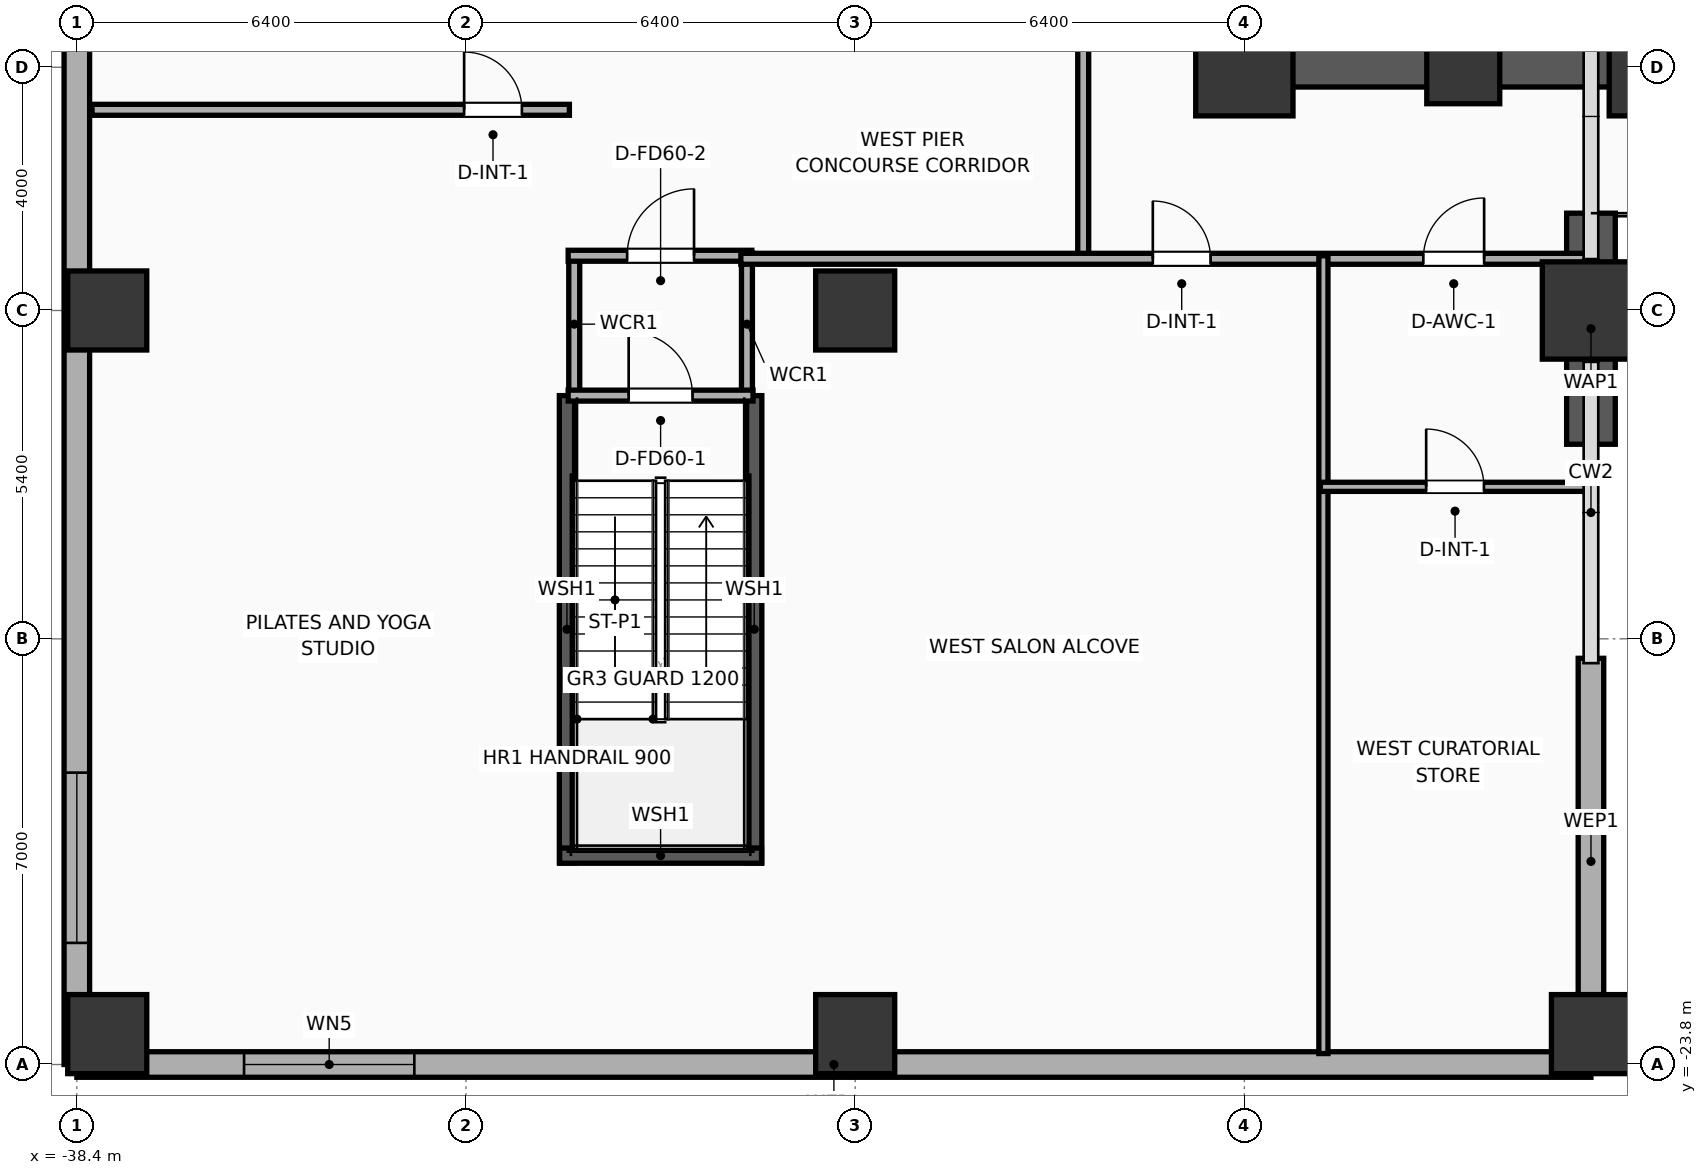
"""IFC4 building model, lengths in metres.
Left out: names, types, materials, properties, quantities, classifications, styles, units other than length and angle.
Written with IfcOpenShell. Run it as: python <this file> out.ifc"""

import sys

from ifc_helpers import new_model, si_unit, direction, frame, frame_2d, origin, origin_2d, place, context, subcontext, project, spatial, rectangle, extrude, element, fill, save


model = new_model("IFC4")
c1 = context("Model", 3, precision=1e-05, world=origin(), true_north=direction((0.0, 1.0)))
c2 = subcontext(c1, "Body", "Model", "MODEL_VIEW")
j1 = project(units=[si_unit("LENGTHUNIT", "METRE"), si_unit("PLANEANGLEUNIT", "RADIAN")], contexts=[c1])
p1 = place(None, origin())
s1 = spatial("IfcSite", under=j1, at=p1, CompositionType="ELEMENT")
p2 = place(p1, origin())
s2 = spatial("IfcBuilding", under=s1, at=p2, CompositionType="ELEMENT")
p3 = place(p2, frame((0.0, 0.0, 10.4)))
s3 = spatial("IfcBuildingStorey", under=s2, at=p3, CompositionType="ELEMENT", Elevation=10.4)
p4 = place(p3, frame((-19.2, -7.4, 0.0), z_axis=(0.0, 0.0, 1.0), x_axis=(1.0, 0.0, 0.0)))
e1 = element("IfcColumn", 1, at=p4, inside=s3, PredefinedType="COLUMN", context=c2, shape_type="SweptSolid", body=[
    extrude(rectangle(XDim=1.6, YDim=1.6, at=origin_2d()), origin(), (0.0, 0.0, 1.0), 5.2),
])
p5 = place(p3, frame((-15.6, -7.4, 0.0), z_axis=(0.0, 0.0, 1.0), x_axis=(1.0, 0.0, 0.0)))
e2 = element("IfcColumn", 2, at=p5, inside=s3, PredefinedType="COLUMN", context=c2, shape_type="SweptSolid", body=[
    extrude(rectangle(XDim=1.2, YDim=1.2, at=origin_2d()), origin(), (0.0, 0.0, 1.0), 5.2),
])
p6 = place(p3, frame((-12.4, -7.4, 0.0), z_axis=(0.0, 0.0, 1.0), x_axis=(1.0, 0.0, 0.0)))
e3 = element("IfcColumn", 3, at=p6, inside=s3, PredefinedType="COLUMN", context=c2, shape_type="SweptSolid", body=[
    extrude(rectangle(XDim=1.6, YDim=1.6, at=origin_2d()), origin(), (0.0, 0.0, 1.0), 5.2),
])
p7 = place(p3, frame((-19.525, -7.4, 0.0), z_axis=(0.0, 0.0, 1.0), x_axis=(1.0, 0.0, 0.0)))
e4 = element("IfcWall", 4, at=p7, inside=s3, PredefinedType="SHEAR", context=c2, shape_type="SweptSolid", body=[
    extrude(rectangle(XDim=7.45, YDim=0.65, at=frame_2d((3.725, 0.0))), origin(), (0.0, 0.0, 1.0), 4.92),
])
p8 = place(p3, frame((-19.145, -7.4, 0.0), z_axis=(0.0, 0.0, 1.0), x_axis=(0.0, 1.0, 0.0)))
e5 = element("IfcWall", 5, at=p8, inside=s3, PredefinedType="SHEAR", context=c2, shape_type="SweptSolid", body=[
    extrude(rectangle(XDim=14.8, YDim=0.65, at=frame_2d((7.4, 0.0))), origin(), (0.0, 0.0, 1.0), 4.92),
])
for number, where, z_axis, x_axis in (
    (6, (-30.34, -20.485, 0.0), (0.0, 0.0, 1.0), (0.0, 1.0, 0.0)),
    (7, (-27.26, -20.485, 0.0), (0.0, 0.0, 1.0), (0.0, 1.0, 0.0)),
):
    element("IfcWall", number, at=place(p3, frame(where, z_axis=z_axis, x_axis=x_axis)), inside=s3, PredefinedType="SOLIDWALL", context=c2, shape_type="SweptSolid", body=[
        extrude(rectangle(XDim=7.685, YDim=0.25, at=frame_2d((3.843, 0.0))), origin(), (0.0, 0.0, 1.0), 4.92),
    ])
p9 = place(p3, frame((-30.46, -20.365, 0.0), z_axis=(0.0, 0.0, 1.0), x_axis=(1.0, 0.0, 0.0)))
e8 = element("IfcWall", 8, at=p9, inside=s3, PredefinedType="SOLIDWALL", context=c2, shape_type="SweptSolid", body=[
    extrude(rectangle(XDim=3.32, YDim=0.25, at=frame_2d((1.66, 0.0))), origin(), (0.0, 0.0, 1.0), 4.92),
])
for number, where, z_axis, x_axis in (
    (9, (-37.9, -23.3, 0.0), (0.0, 0.0, 1.0), (1.0, 0.0, 0.0)),
    (10, (-37.9, -11.4, 0.0), (0.0, 0.0, 1.0), (1.0, 0.0, 0.0)),
    (11, (-25.6, -23.3, 0.0), (0.0, 0.0, 1.0), (1.0, 0.0, 0.0)),
    (12, (-25.6, -11.4, 0.0), (0.0, 0.0, 1.0), (1.0, 0.0, 0.0)),
    (13, (-13.5, -23.3, 0.0), (0.0, 0.0, 1.0), (1.0, 0.0, 0.0)),
):
    element("IfcColumn", number, at=place(p3, frame(where, z_axis=z_axis, x_axis=x_axis)), inside=s3, PredefinedType="COLUMN", context=c2, shape_type="SweptSolid", body=[
        extrude(rectangle(XDim=1.3, YDim=1.3, at=origin_2d()), origin(), (0.0, 0.0, 1.0), 5.2),
    ])
p10 = place(p3, frame((-13.5, -11.4, 0.0), z_axis=(0.0, 0.0, 1.0), x_axis=(1.0, 0.0, 0.0)))
e14 = element("IfcColumn", 14, at=p10, inside=s3, PredefinedType="COLUMN", context=c2, shape_type="SweptSolid", body=[
    extrude(rectangle(XDim=1.6, YDim=1.6, at=origin_2d()), origin(), (0.0, 0.0, 1.0), 5.2),
])
p11 = place(p3, frame((-13.5, -13.6, 0.0), z_axis=(0.0, 0.0, 1.0), x_axis=(0.0, 1.0, 0.0)))
e15 = element("IfcWall", 15, at=p11, inside=s3, PredefinedType="SOLIDWALL", context=c2, shape_type="SweptSolid", body=[
    extrude(rectangle(XDim=3.8, YDim=0.8, at=frame_2d((1.9, 0.0))), origin(), (0.0, 0.0, 1.0), 4.92),
])
p12 = place(p3, frame((-38.4, -23.8, 0.0), z_axis=(0.0, 0.0, 1.0), x_axis=(1.0, 0.0, 0.0)))
e16 = element("IfcWall", 16, at=p12, inside=s3, PredefinedType="ELEMENTEDWALL", context=c2, shape_type="SweptSolid", body=[
    extrude(rectangle(XDim=24.9, YDim=0.42, at=frame_2d((12.45, 0.0))), origin(), (0.0, 0.0, 1.0), 4.92),
])
p13 = place(p12, frame((2.75, 0.0, 0.65)))
e17 = element("IfcOpeningElement", 17, at=p13, cuts=e16, PredefinedType="OPENING", context=c2, shape_type="SweptSolid", body=[
    extrude(rectangle(XDim=2.8, YDim=2.6, at=frame_2d((1.4, 1.3))), frame((0.0, 0.22, 0.0), z_axis=(0.0, -1.0, 0.0), x_axis=(1.0, 0.0, 0.0)), (0.0, 0.0, 1.0), 0.44),
])
p14 = place(p3, frame((-13.5, -23.8, 0.0), z_axis=(0.0, 0.0, 1.0), x_axis=(0.0, 1.0, 0.0)))
e18 = element("IfcWall", 18, at=p14, inside=s3, PredefinedType="ELEMENTEDWALL", context=c2, shape_type="SweptSolid", body=[
    extrude(rectangle(XDim=6.68, YDim=0.42, at=frame_2d((3.34, 0.0))), origin(), (0.0, 0.0, 1.0), 4.21),
])
p15 = place(p3, frame((-38.4, 23.8, 0.0), z_axis=(0.0, 0.0, 1.0), x_axis=(0.0, -1.0, 0.0)))
e19 = element("IfcWall", 19, at=p15, inside=s3, PredefinedType="ELEMENTEDWALL", context=c2, shape_type="SweptSolid", body=[
    extrude(rectangle(XDim=47.6, YDim=0.42, at=frame_2d((23.8, 0.0))), origin(), (0.0, 0.0, 1.0), 4.92),
])
p16 = place(p15, frame((2.0, 0.0, 0.65)))
e20 = element("IfcOpeningElement", 20, at=p16, cuts=e19, PredefinedType="OPENING", context=c2, shape_type="SweptSolid", body=[
    extrude(rectangle(XDim=2.8, YDim=2.6, at=frame_2d((1.4, 1.3))), frame((0.0, 0.22, 0.0), z_axis=(0.0, -1.0, 0.0), x_axis=(1.0, 0.0, 0.0)), (0.0, 0.0, 1.0), 0.44),
])
p17 = place(p15, frame((15.6, 0.0, 0.65)))
e21 = element("IfcOpeningElement", 21, at=p17, cuts=e19, PredefinedType="OPENING", context=c2, shape_type="SweptSolid", body=[
    extrude(rectangle(XDim=2.8, YDim=2.6, at=frame_2d((1.4, 1.3))), frame((0.0, 0.22, 0.0), z_axis=(0.0, -1.0, 0.0), x_axis=(1.0, 0.0, 0.0)), (0.0, 0.0, 1.0), 0.44),
])
p18 = place(p15, frame((42.8, 0.0, 0.65)))
e22 = element("IfcOpeningElement", 22, at=p18, cuts=e19, PredefinedType="OPENING", context=c2, shape_type="SweptSolid", body=[
    extrude(rectangle(XDim=2.8, YDim=2.6, at=frame_2d((1.4, 1.3))), frame((0.0, 0.22, 0.0), z_axis=(0.0, -1.0, 0.0), x_axis=(1.0, 0.0, 0.0)), (0.0, 0.0, 1.0), 0.44),
])
p19 = place(p3, frame((-15.4, -4.8, 0.0), z_axis=(0.0, 0.0, 1.0), x_axis=(0.0, -1.0, 0.0)))
e23 = element("IfcWall", 23, at=p19, inside=s3, PredefinedType="SOLIDWALL", context=c2, shape_type="SweptSolid", body=[
    extrude(rectangle(XDim=2.6, YDim=0.25, at=frame_2d((1.3, 0.0))), origin(), (0.0, 0.0, 1.0), 4.92),
])
for number, where, z_axis, x_axis in (
    (24, (-30.22, -12.8, 0.0), (0.0, 0.0, 1.0), (0.0, 1.0, 0.0)),
    (25, (-27.38, -12.8, 0.0), (0.0, 0.0, 1.0), (0.0, 1.0, 0.0)),
):
    element("IfcWall", number, at=place(p3, frame(where, z_axis=z_axis, x_axis=x_axis)), inside=s3, PredefinedType="PARTITIONING", context=c2, shape_type="SweptSolid", body=[
        extrude(rectangle(XDim=2.35, YDim=0.18, at=frame_2d((1.175, 0.0))), origin(), (0.0, 0.0, 1.0), 4.92),
    ])
p20 = place(p3, frame((-30.32, -12.8, 0.0), z_axis=(0.0, 0.0, 1.0), x_axis=(1.0, 0.0, 0.0)))
e26 = element("IfcWall", 26, at=p20, inside=s3, PredefinedType="PARTITIONING", context=c2, shape_type="SweptSolid", body=[
    extrude(rectangle(XDim=3.04, YDim=0.18, at=frame_2d((1.52, 0.0))), origin(), (0.0, 0.0, 1.0), 4.92),
])
p21 = place(p20, frame((0.995, 0.0, 0.0)))
e27 = element("IfcOpeningElement", 27, at=p21, cuts=e26, PredefinedType="OPENING", context=c2, shape_type="SweptSolid", body=[
    extrude(rectangle(XDim=1.05, YDim=2.05, at=frame_2d((0.525, 1.025))), frame((0.0, 0.1, 0.0), z_axis=(0.0, -1.0, 0.0), x_axis=(1.0, 0.0, 0.0)), (0.0, 0.0, 1.0), 0.2),
])
p22 = place(p3, frame((-30.32, -10.5, 0.0), z_axis=(0.0, 0.0, 1.0), x_axis=(1.0, 0.0, 0.0)))
e28 = element("IfcWall", 28, at=p22, inside=s3, PredefinedType="PARTITIONING", context=c2, shape_type="SweptSolid", body=[
    extrude(rectangle(XDim=3.02, YDim=0.18, at=frame_2d((1.51, 0.0))), origin(), (0.0, 0.0, 1.0), 4.92),
])
p23 = place(p22, frame((0.97, 0.0, 0.0)))
e29 = element("IfcOpeningElement", 29, at=p23, cuts=e28, PredefinedType="OPENING", context=c2, shape_type="SweptSolid", body=[
    extrude(rectangle(XDim=1.1, YDim=2.05, at=frame_2d((0.55, 1.025))), frame((0.0, 0.1, 0.0), z_axis=(0.0, -1.0, 0.0), x_axis=(1.0, 0.0, 0.0)), (0.0, 0.0, 1.0), 0.2),
])
p24 = place(p3, frame((-38.15, -8.1, 0.0), z_axis=(0.0, 0.0, 1.0), x_axis=(1.0, 0.0, 0.0)))
e30 = element("IfcWall", 30, at=p24, inside=s3, PredefinedType="PARTITIONING", context=c2, shape_type="SweptSolid", body=[
    extrude(rectangle(XDim=7.85, YDim=0.18, at=frame_2d((3.925, 0.0))), origin(), (0.0, 0.0, 1.0), 4.92),
])
p25 = place(p24, frame((6.119, 0.0, 0.0)))
e31 = element("IfcOpeningElement", 31, at=p25, cuts=e30, PredefinedType="OPENING", context=c2, shape_type="SweptSolid", body=[
    extrude(rectangle(XDim=0.95, YDim=2.05, at=frame_2d((0.475, 1.025))), frame((0.0, 0.1, 0.0), z_axis=(0.0, -1.0, 0.0), x_axis=(1.0, 0.0, 0.0)), (0.0, 0.0, 1.0), 0.2),
])
p26 = place(p3, frame((-21.85, -10.5, 0.0), z_axis=(0.0, 0.0, 1.0), x_axis=(0.0, 1.0, 0.0)))
e32 = element("IfcWall", 32, at=p26, inside=s3, PredefinedType="PARTITIONING", context=c2, shape_type="SweptSolid", body=[
    extrude(rectangle(XDim=34.12, YDim=0.18, at=frame_2d((17.06, 0.0))), origin(), (0.0, 0.0, 1.0), 4.92),
])
p27 = place(p26, frame((13.531, 0.0, 0.0)))
e33 = element("IfcOpeningElement", 33, at=p27, cuts=e32, PredefinedType="OPENING", context=c2, shape_type="SweptSolid", body=[
    extrude(rectangle(XDim=1.6, YDim=2.05, at=frame_2d((0.8, 1.025))), frame((0.0, 0.1, 0.0), z_axis=(0.0, -1.0, 0.0), x_axis=(1.0, 0.0, 0.0)), (0.0, 0.0, 1.0), 0.2),
])
p28 = place(p3, frame((-27.48, -10.55, 0.0), z_axis=(0.0, 0.0, 1.0), x_axis=(1.0, 0.0, 0.0)))
e34 = element("IfcWall", 34, at=p28, inside=s3, PredefinedType="PARTITIONING", context=c2, shape_type="SweptSolid", body=[
    extrude(rectangle(XDim=13.96, YDim=0.18, at=frame_2d((6.98, 0.0))), origin(), (0.0, 0.0, 1.0), 4.92),
])
p29 = place(p28, frame((6.775, 0.0, 0.0)))
e35 = element("IfcOpeningElement", 35, at=p29, cuts=e34, PredefinedType="OPENING", context=c2, shape_type="SweptSolid", body=[
    extrude(rectangle(XDim=0.95, YDim=2.05, at=frame_2d((0.475, 1.025))), frame((0.0, 0.1, 0.0), z_axis=(0.0, -1.0, 0.0), x_axis=(1.0, 0.0, 0.0)), (0.0, 0.0, 1.0), 0.2),
])
p30 = place(p28, frame((11.223, 0.0, 0.0)))
e36 = element("IfcOpeningElement", 36, at=p30, cuts=e34, PredefinedType="OPENING", context=c2, shape_type="SweptSolid", body=[
    extrude(rectangle(XDim=1.0, YDim=2.05, at=frame_2d((0.5, 1.025))), frame((0.0, 0.1, 0.0), z_axis=(0.0, -1.0, 0.0), x_axis=(1.0, 0.0, 0.0)), (0.0, 0.0, 1.0), 0.2),
])
p31 = place(p3, frame((-17.9, -23.62, 0.0), z_axis=(0.0, 0.0, 1.0), x_axis=(0.0, 1.0, 0.0)))
e37 = element("IfcWall", 37, at=p31, inside=s3, PredefinedType="PLUMBINGWALL", context=c2, shape_type="SweptSolid", body=[
    extrude(rectangle(XDim=13.12, YDim=0.15, at=frame_2d((6.56, 0.0))), origin(), (0.0, 0.0, 1.0), 4.92),
])
p32 = place(p3, frame((-17.95, -14.3, 0.0), z_axis=(0.0, 0.0, 1.0), x_axis=(1.0, 0.0, 0.0)))
e38 = element("IfcWall", 38, at=p32, inside=s3, PredefinedType="PLUMBINGWALL", context=c2, shape_type="SweptSolid", body=[
    extrude(rectangle(XDim=4.43, YDim=0.15, at=frame_2d((2.215, 0.0))), origin(), (0.0, 0.0, 1.0), 4.92),
])
p33 = place(p32, frame((1.74, 0.0, 0.0)))
e39 = element("IfcOpeningElement", 39, at=p33, cuts=e38, PredefinedType="OPENING", context=c2, shape_type="SweptSolid", body=[
    extrude(rectangle(XDim=0.95, YDim=2.05, at=frame_2d((0.475, 1.025))), frame((0.0, 0.085, 0.0), z_axis=(0.0, -1.0, 0.0), x_axis=(1.0, 0.0, 0.0)), (0.0, 0.0, 1.0), 0.17),
])
p34 = place(p13, origin())
e40 = element("IfcWindow", 40, at=p34, inside=s3, PartitioningType="SINGLE_PANEL", PredefinedType="WINDOW", context=c2, shape_type="SweptSolid", body=[
    extrude(rectangle(XDim=2.8, YDim=2.6, at=frame_2d((1.4, 1.3))), frame((0.0, 0.03, 0.0), z_axis=(0.0, -1.0, 0.0), x_axis=(1.0, 0.0, 0.0)), (0.0, 0.0, 1.0), 0.06),
])
fill(e17, e40)
p35 = place(p18, origin())
e41 = element("IfcWindow", 41, at=p35, inside=s3, PartitioningType="SINGLE_PANEL", PredefinedType="WINDOW", context=c2, shape_type="SweptSolid", body=[
    extrude(rectangle(XDim=2.8, YDim=2.6, at=frame_2d((1.4, 1.3))), frame((0.0, 0.03, 0.0), z_axis=(0.0, -1.0, 0.0), x_axis=(1.0, 0.0, 0.0)), (0.0, 0.0, 1.0), 0.06),
])
fill(e22, e41)
p36 = place(p21, origin())
e42 = element("IfcDoor", 42, at=p36, inside=s3, OperationType="SINGLE_SWING_LEFT", PredefinedType="DOOR", context=c2, shape_type="SweptSolid", body=[
    extrude(rectangle(XDim=1.05, YDim=2.05, at=frame_2d((0.525, 1.025))), frame((0.0, 0.025, 0.0), z_axis=(0.0, -1.0, 0.0), x_axis=(1.0, 0.0, 0.0)), (0.0, 0.0, 1.0), 0.05),
])
fill(e27, e42)
p37 = place(p23, origin())
e43 = element("IfcDoor", 43, at=p37, inside=s3, OperationType="SINGLE_SWING_RIGHT", PredefinedType="DOOR", context=c2, shape_type="SweptSolid", body=[
    extrude(rectangle(XDim=1.1, YDim=2.05, at=frame_2d((0.55, 1.025))), frame((0.0, 0.025, 0.0), z_axis=(0.0, -1.0, 0.0), x_axis=(1.0, 0.0, 0.0)), (0.0, 0.0, 1.0), 0.05),
])
fill(e29, e43)
p38 = place(p25, origin())
e44 = element("IfcDoor", 44, at=p38, inside=s3, OperationType="SINGLE_SWING_LEFT", PredefinedType="DOOR", context=c2, shape_type="SweptSolid", body=[
    extrude(rectangle(XDim=0.95, YDim=2.05, at=frame_2d((0.475, 1.025))), frame((0.0, 0.025, 0.0), z_axis=(0.0, -1.0, 0.0), x_axis=(1.0, 0.0, 0.0)), (0.0, 0.0, 1.0), 0.05),
])
fill(e31, e44)
p39 = place(p29, origin())
e45 = element("IfcDoor", 45, at=p39, inside=s3, OperationType="SINGLE_SWING_LEFT", PredefinedType="DOOR", context=c2, shape_type="SweptSolid", body=[
    extrude(rectangle(XDim=0.95, YDim=2.05, at=frame_2d((0.475, 1.025))), frame((0.0, 0.025, 0.0), z_axis=(0.0, -1.0, 0.0), x_axis=(1.0, 0.0, 0.0)), (0.0, 0.0, 1.0), 0.05),
])
fill(e35, e45)
p40 = place(p30, origin())
e46 = element("IfcDoor", 46, at=p40, inside=s3, OperationType="SINGLE_SWING_RIGHT", PredefinedType="DOOR", context=c2, shape_type="SweptSolid", body=[
    extrude(rectangle(XDim=1.0, YDim=2.05, at=frame_2d((0.5, 1.025))), frame((0.0, 0.025, 0.0), z_axis=(0.0, -1.0, 0.0), x_axis=(1.0, 0.0, 0.0)), (0.0, 0.0, 1.0), 0.05),
])
fill(e36, e46)
p41 = place(p33, origin())
e47 = element("IfcDoor", 47, at=p41, inside=s3, OperationType="SINGLE_SWING_LEFT", PredefinedType="DOOR", context=c2, shape_type="SweptSolid", body=[
    extrude(rectangle(XDim=0.95, YDim=2.05, at=frame_2d((0.475, 1.025))), frame((0.0, 0.025, 0.0), z_axis=(0.0, -1.0, 0.0), x_axis=(1.0, 0.0, 0.0)), (0.0, 0.0, 1.0), 0.05),
])
fill(e39, e47)
save(model, sys.argv[1])
